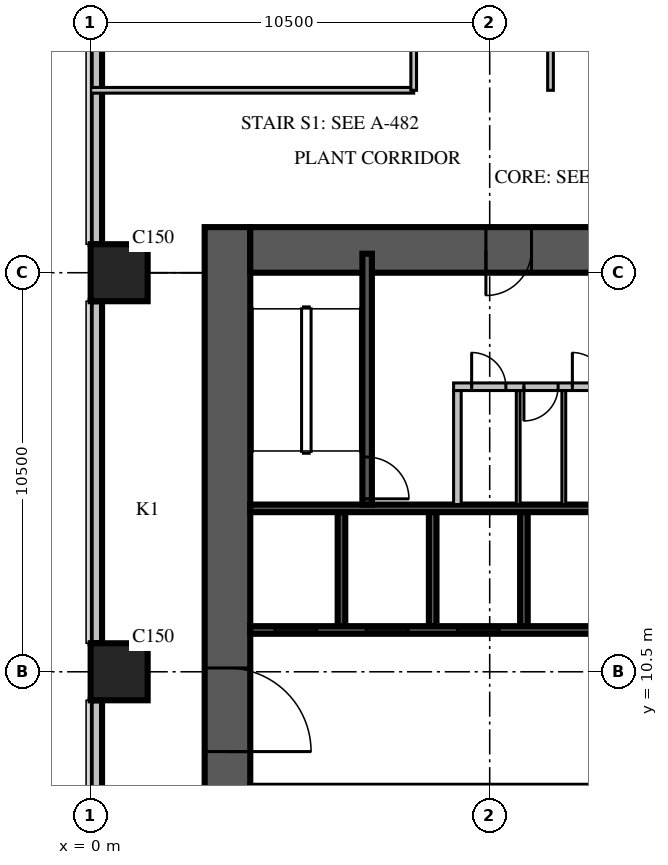
"""IFC4 building model, lengths in metres.
Left out: names, types, materials, properties, quantities, classifications, styles, units other than length and angle.
Written with IfcOpenShell. Run it as: python <this file> out.ifc"""

import sys

from ifc_helpers import new_model, si_unit, direction, frame, frame_2d, origin, origin_2d, place, context, subcontext, project, spatial, rectangle, extrude, source, transform, mapped, element, fill, save


model = new_model("IFC4")
c1 = context("Model", 3, precision=1e-05, world=origin(), true_north=direction((0.0, 1.0)))
c2 = subcontext(c1, "Body", "Model", "MODEL_VIEW")
j1 = project(units=[si_unit("LENGTHUNIT", "METRE"), si_unit("PLANEANGLEUNIT", "RADIAN")], contexts=[c1])
p1 = place(None, origin())
s1 = spatial("IfcSite", under=j1, at=p1, CompositionType="ELEMENT")
p2 = place(p1, origin())
s2 = spatial("IfcBuilding", under=s1, at=p2, CompositionType="ELEMENT")
p3 = place(p2, frame((0.0, 0.0, 34.5)))
s3 = spatial("IfcBuildingStorey", under=s2, at=p3, CompositionType="ELEMENT", Elevation=34.5)
p4 = place(p3, frame((0.75, 10.5, 0.0), z_axis=(0.0, 0.0, 1.0), x_axis=(1.0, 0.0, 0.0)))
e1 = element("IfcColumn", 1, at=p4, inside=s3, PredefinedType="COLUMN", context=c2, shape_type="SweptSolid", body=[
    extrude(rectangle(XDim=1.5, YDim=1.5, at=origin_2d()), origin(), (0.0, 0.0, 1.0), 6.0),
])
m1 = source(origin(), c2, "Body", "SweptSolid", [
    extrude(rectangle(XDim=1.5, YDim=1.5, at=origin_2d()), origin(), (0.0, 0.0, 1.0), 6.0),
])
p5 = place(p3, frame((0.75, 21.0, 0.0), z_axis=(0.0, 0.0, 1.0), x_axis=(1.0, 0.0, 0.0)))
e2 = element("IfcColumn", 2, at=p5, inside=s3, PredefinedType="COLUMN", context=c2, shape_type="MappedRepresentation", body=[
    mapped(m1, transform((0.0, 0.0, 0.0), scale=1.0)),
])
p6 = place(p3, frame((3.6, 4.2, 0.0), z_axis=(0.0, 0.0, 1.0), x_axis=(0.0, 1.0, 0.0)))
e3 = element("IfcWall", 3, at=p6, inside=s3, PredefinedType="SHEAR", context=c2, shape_type="SweptSolid", body=[
    extrude(rectangle(XDim=18.0, YDim=1.2, at=frame_2d((9.0, 0.0))), origin(), (0.0, 0.0, 1.0), 6.0),
])
m2 = source(origin(), c2, "Body", "SweptSolid", [
    extrude(rectangle(XDim=2.2, YDim=2.1, at=frame_2d((1.1, 1.05))), frame((0.0, 0.61, 0.0), z_axis=(0.0, -1.0, 0.0), x_axis=(1.0, 0.0, 0.0)), (0.0, 0.0, 1.0), 1.22),
])
p7 = place(p6, frame((4.2, 0.0, 0.0)))
e4 = element("IfcOpeningElement", 4, at=p7, cuts=e3, PredefinedType="OPENING", context=c2, shape_type="MappedRepresentation", body=[
    mapped(m2, transform((0.0, 0.0, 0.0), scale=1.0)),
])
m3 = source(origin(), c2, "Body", "SweptSolid", [
    extrude(rectangle(XDim=16.8, YDim=1.2, at=frame_2d((8.4, 0.0))), origin(), (0.0, 0.0, 1.0), 6.0),
])
p8 = place(p3, frame((4.2, 21.6, 0.0), z_axis=(0.0, 0.0, 1.0), x_axis=(1.0, 0.0, 0.0)))
e5 = element("IfcWall", 5, at=p8, inside=s3, PredefinedType="SHEAR", context=c2, shape_type="MappedRepresentation", body=[
    mapped(m3, transform((0.0, 0.0, 0.0), scale=1.0)),
])
m4 = source(origin(), c2, "Body", "SweptSolid", [
    extrude(rectangle(XDim=1.2, YDim=2.1, at=frame_2d((0.6, 1.05))), frame((0.0, 0.61, 0.0), z_axis=(0.0, -1.0, 0.0), x_axis=(1.0, 0.0, 0.0)), (0.0, 0.0, 1.0), 1.22),
])
p9 = place(p8, frame((6.2, 0.0, 0.0)))
e6 = element("IfcOpeningElement", 6, at=p9, cuts=e5, PredefinedType="OPENING", context=c2, shape_type="MappedRepresentation", body=[
    mapped(m4, transform((0.0, 0.0, 0.0), scale=1.0)),
])
m5 = source(origin(), c2, "Body", "SweptSolid", [
    extrude(rectangle(XDim=15.3, YDim=0.3, at=frame_2d((7.65, 0.0))), origin(), (0.0, 0.0, 1.0), 3.6),
])
p10 = place(p3, frame((0.15, 37.05, 0.0), z_axis=(0.0, 0.0, 1.0), x_axis=(0.0, -1.0, 0.0)))
e7 = element("IfcWall", 7, at=p10, inside=s3, PredefinedType="STANDARD", context=c2, shape_type="MappedRepresentation", body=[
    mapped(m5, transform((0.0, 0.0, 0.0), scale=1.0)),
])
m6 = source(origin(), c2, "Body", "SweptSolid", [
    extrude(rectangle(XDim=9.0, YDim=0.3, at=frame_2d((4.5, 0.0))), origin(), (0.0, 0.0, 1.0), 5.6),
])
p11 = place(p3, frame((0.15, 20.25, 0.0), z_axis=(0.0, 0.0, 1.0), x_axis=(0.0, -1.0, 0.0)))
e8 = element("IfcWall", 8, at=p11, inside=s3, PredefinedType="STANDARD", context=c2, shape_type="MappedRepresentation", body=[
    mapped(m6, transform((0.0, 0.0, 0.0), scale=1.0)),
])
m7 = source(origin(), c2, "Body", "SweptSolid", [
    extrude(rectangle(XDim=5.55, YDim=0.3, at=frame_2d((2.775, 0.0))), origin(), (0.0, 0.0, 1.0), 5.6),
])
p12 = place(p3, frame((0.15, 9.75, 0.0), z_axis=(0.0, 0.0, 1.0), x_axis=(0.0, -1.0, 0.0)))
e9 = element("IfcWall", 9, at=p12, inside=s3, PredefinedType="STANDARD", context=c2, shape_type="MappedRepresentation", body=[
    mapped(m7, transform((0.0, 0.0, 0.0), scale=1.0)),
])
p13 = place(p3, frame((6.6, 11.7, 0.0), z_axis=(0.0, 0.0, 1.0), x_axis=(0.0, 1.0, 0.0)))
e10 = element("IfcWall", 10, at=p13, inside=s3, PredefinedType="SOLIDWALL", context=c2, shape_type="SweptSolid", body=[
    extrude(rectangle(XDim=3.0, YDim=0.2, at=frame_2d((1.5, 0.0))), origin(), (0.0, 0.0, 1.0), 6.0),
])
m8 = source(origin(), c2, "Body", "SweptSolid", [
    extrude(rectangle(XDim=3.0, YDim=0.2, at=frame_2d((1.5, 0.0))), origin(), (0.0, 0.0, 1.0), 6.0),
])
for number, where, z_axis, x_axis in (
    (11, (9.0, 11.7, 0.0), (0.0, 0.0, 1.0), (0.0, 1.0, 0.0)),
    (12, (11.4, 11.7, 0.0), (0.0, 0.0, 1.0), (0.0, 1.0, 0.0)),
):
    element("IfcWall", number, at=place(p3, frame(where, z_axis=z_axis, x_axis=x_axis)), inside=s3, PredefinedType="SOLIDWALL", context=c2, shape_type="MappedRepresentation", body=[
        mapped(m8, transform((0.0, 0.0, 0.0), scale=1.0)),
    ])
m9 = source(origin(), c2, "Body", "SweptSolid", [
    extrude(rectangle(XDim=16.8, YDim=0.2, at=frame_2d((8.4, 0.0))), origin(), (0.0, 0.0, 1.0), 6.0),
])
p14 = place(p3, frame((4.2, 11.6, 0.0), z_axis=(0.0, 0.0, 1.0), x_axis=(1.0, 0.0, 0.0)))
e13 = element("IfcWall", 13, at=p14, inside=s3, PredefinedType="SOLIDWALL", context=c2, shape_type="MappedRepresentation", body=[
    mapped(m9, transform((0.0, 0.0, 0.0), scale=1.0)),
])
m10 = source(origin(), c2, "Body", "SweptSolid", [
    extrude(rectangle(XDim=1.1, YDim=2.1, at=frame_2d((0.55, 1.05))), frame((0.0, 0.11, 0.0), z_axis=(0.0, -1.0, 0.0), x_axis=(1.0, 0.0, 0.0)), (0.0, 0.0, 1.0), 0.22),
])
p15 = place(p14, frame((0.65, 0.0, 0.0)))
e14 = element("IfcOpeningElement", 14, at=p15, cuts=e13, PredefinedType="OPENING", context=c2, shape_type="MappedRepresentation", body=[
    mapped(m10, transform((0.0, 0.0, 0.0), scale=1.0)),
])
p16 = place(p14, frame((3.05, 0.0, 0.0)))
e15 = element("IfcOpeningElement", 15, at=p16, cuts=e13, PredefinedType="OPENING", context=c2, shape_type="MappedRepresentation", body=[
    mapped(m10, transform((0.0, 0.0, 0.0), scale=1.0)),
])
p17 = place(p14, frame((5.45, 0.0, 0.0)))
e16 = element("IfcOpeningElement", 16, at=p17, cuts=e13, PredefinedType="OPENING", context=c2, shape_type="MappedRepresentation", body=[
    mapped(m10, transform((0.0, 0.0, 0.0), scale=1.0)),
])
p18 = place(p3, frame((4.2, 14.8, 0.0), z_axis=(0.0, 0.0, 1.0), x_axis=(1.0, 0.0, 0.0)))
e17 = element("IfcWall", 17, at=p18, inside=s3, PredefinedType="SOLIDWALL", context=c2, shape_type="MappedRepresentation", body=[
    mapped(m9, transform((0.0, 0.0, 0.0), scale=1.0)),
])
p19 = place(p18, frame((10.25, 0.0, 0.0)))
e18 = element("IfcOpeningElement", 18, at=p19, cuts=e17, PredefinedType="OPENING", context=c2, shape_type="MappedRepresentation", body=[
    mapped(m10, transform((0.0, 0.0, 0.0), scale=1.0)),
])
p20 = place(p18, frame((12.65, 0.0, 0.0)))
e19 = element("IfcOpeningElement", 19, at=p20, cuts=e17, PredefinedType="OPENING", context=c2, shape_type="MappedRepresentation", body=[
    mapped(m10, transform((0.0, 0.0, 0.0), scale=1.0)),
])
p21 = place(p18, frame((15.05, 0.0, 0.0)))
e20 = element("IfcOpeningElement", 20, at=p21, cuts=e17, PredefinedType="OPENING", context=c2, shape_type="MappedRepresentation", body=[
    mapped(m10, transform((0.0, 0.0, 0.0), scale=1.0)),
])
p22 = place(p3, frame((7.275, 14.9, 0.0), z_axis=(0.0, 0.0, 1.0), x_axis=(0.0, 1.0, 0.0)))
e21 = element("IfcWall", 21, at=p22, inside=s3, PredefinedType="SOLIDWALL", context=c2, shape_type="SweptSolid", body=[
    extrude(rectangle(XDim=6.6, YDim=0.25, at=frame_2d((3.3, 0.0))), origin(), (0.0, 0.0, 1.0), 5.6),
])
m11 = source(origin(), c2, "Body", "SweptSolid", [
    extrude(rectangle(XDim=1.1, YDim=2.1, at=frame_2d((0.55, 1.05))), frame((0.0, 0.135, 0.0), z_axis=(0.0, -1.0, 0.0), x_axis=(1.0, 0.0, 0.0)), (0.0, 0.0, 1.0), 0.27),
])
p23 = place(p22, frame((0.15, 0.0, 0.0)))
e22 = element("IfcOpeningElement", 22, at=p23, cuts=e21, PredefinedType="OPENING", context=c2, shape_type="MappedRepresentation", body=[
    mapped(m11, transform((0.0, 0.0, 0.0), scale=1.0)),
])
p24 = place(p3, frame((9.65, 14.9, 0.0), z_axis=(0.0, 0.0, 1.0), x_axis=(0.0, 1.0, 0.0)))
e23 = element("IfcWall", 23, at=p24, inside=s3, PredefinedType="PARTITIONING", context=c2, shape_type="SweptSolid", body=[
    extrude(rectangle(XDim=3.0, YDim=0.2, at=frame_2d((1.5, 0.0))), origin(), (0.0, 0.0, 1.0), 5.6),
])
p25 = place(p3, frame((9.55, 18.0, 0.0), z_axis=(0.0, 0.0, 1.0), x_axis=(1.0, 0.0, 0.0)))
e24 = element("IfcWall", 24, at=p25, inside=s3, PredefinedType="PARTITIONING", context=c2, shape_type="SweptSolid", body=[
    extrude(rectangle(XDim=11.45, YDim=0.2, at=frame_2d((5.725, 0.0))), origin(), (0.0, 0.0, 1.0), 5.6),
])
m12 = source(origin(), c2, "Body", "SweptSolid", [
    extrude(rectangle(XDim=0.9, YDim=2.1, at=frame_2d((0.45, 1.05))), frame((0.0, 0.11, 0.0), z_axis=(0.0, -1.0, 0.0), x_axis=(1.0, 0.0, 0.0)), (0.0, 0.0, 1.0), 0.22),
])
p26 = place(p25, frame((0.475, 0.0, 0.0)))
e25 = element("IfcOpeningElement", 25, at=p26, cuts=e24, PredefinedType="OPENING", context=c2, shape_type="MappedRepresentation", body=[
    mapped(m12, transform((0.0, 0.0, 0.0), scale=1.0)),
])
p27 = place(p25, frame((1.85, 0.0, 0.0)))
e26 = element("IfcOpeningElement", 26, at=p27, cuts=e24, PredefinedType="OPENING", context=c2, shape_type="MappedRepresentation", body=[
    mapped(m12, transform((0.0, 0.0, 0.0), scale=1.0)),
])
p28 = place(p25, frame((3.125, 0.0, 0.0)))
e27 = element("IfcOpeningElement", 27, at=p28, cuts=e24, PredefinedType="OPENING", context=c2, shape_type="MappedRepresentation", body=[
    mapped(m12, transform((0.0, 0.0, 0.0), scale=1.0)),
])
p29 = place(p25, frame((7.35, 0.0, 0.0)))
e28 = element("IfcOpeningElement", 28, at=p29, cuts=e24, PredefinedType="OPENING", context=c2, shape_type="MappedRepresentation", body=[
    mapped(m10, transform((0.0, 0.0, 0.0), scale=1.0)),
])
p30 = place(p3, frame((11.25, 14.9, 0.0), z_axis=(0.0, 0.0, 1.0), x_axis=(0.0, 1.0, 0.0)))
e29 = element("IfcWall", 29, at=p30, inside=s3, PredefinedType="PARTITIONING", context=c2, shape_type="SweptSolid", body=[
    extrude(rectangle(XDim=3.0, YDim=0.1, at=frame_2d((1.5, 0.0))), origin(), (0.0, 0.0, 1.0), 5.6),
])
m13 = source(origin(), c2, "Body", "SweptSolid", [
    extrude(rectangle(XDim=3.0, YDim=0.1, at=frame_2d((1.5, 0.0))), origin(), (0.0, 0.0, 1.0), 5.6),
])
p31 = place(p3, frame((12.45, 14.9, 0.0), z_axis=(0.0, 0.0, 1.0), x_axis=(0.0, 1.0, 0.0)))
e30 = element("IfcWall", 30, at=p31, inside=s3, PredefinedType="PARTITIONING", context=c2, shape_type="MappedRepresentation", body=[
    mapped(m13, transform((0.0, 0.0, 0.0), scale=1.0)),
])
p32 = place(p3, frame((0.0, 25.8, 0.0), z_axis=(0.0, 0.0, 1.0), x_axis=(1.0, 0.0, 0.0)))
e31 = element("IfcWall", 31, at=p32, inside=s3, PredefinedType="PARTITIONING", context=c2, shape_type="SweptSolid", body=[
    extrude(rectangle(XDim=8.5, YDim=0.15, at=frame_2d((4.25, 0.0))), origin(), (0.0, 0.0, 1.0), 5.6),
])
p33 = place(p3, frame((8.5, 25.8, 0.0), z_axis=(0.0, 0.0, 1.0), x_axis=(0.0, 1.0, 0.0)))
e32 = element("IfcWall", 32, at=p33, inside=s3, PredefinedType="PARTITIONING", context=c2, shape_type="SweptSolid", body=[
    extrude(rectangle(XDim=12.6, YDim=0.15, at=frame_2d((6.3, 0.0))), origin(), (0.0, 0.0, 1.0), 5.6),
])
m14 = source(origin(), c2, "Body", "SweptSolid", [
    extrude(rectangle(XDim=1.2, YDim=2.1, at=frame_2d((0.6, 1.05))), frame((0.0, 0.085, 0.0), z_axis=(0.0, -1.0, 0.0), x_axis=(1.0, 0.0, 0.0)), (0.0, 0.0, 1.0), 0.17),
])
p34 = place(p33, frame((4.175, 0.0, 0.0)))
e33 = element("IfcOpeningElement", 33, at=p34, cuts=e32, PredefinedType="OPENING", context=c2, shape_type="MappedRepresentation", body=[
    mapped(m14, transform((0.0, 0.0, 0.0), scale=1.0)),
])
p35 = place(p33, frame((10.25, 0.0, 0.0)))
e34 = element("IfcOpeningElement", 34, at=p35, cuts=e32, PredefinedType="OPENING", context=c2, shape_type="MappedRepresentation", body=[
    mapped(m14, transform((0.0, 0.0, 0.0), scale=1.0)),
])
p36 = place(p3, frame((12.1, 25.8, 0.0), z_axis=(0.0, 0.0, 1.0), x_axis=(0.0, 1.0, 0.0)))
e35 = element("IfcWall", 35, at=p36, inside=s3, PredefinedType="PARTITIONING", context=c2, shape_type="SweptSolid", body=[
    extrude(rectangle(XDim=38.2, YDim=0.15, at=frame_2d((19.1, 0.0))), origin(), (0.0, 0.0, 1.0), 5.6),
])
p37 = place(p36, frame((4.175, 0.0, 0.0)))
e36 = element("IfcOpeningElement", 36, at=p37, cuts=e35, PredefinedType="OPENING", context=c2, shape_type="MappedRepresentation", body=[
    mapped(m14, transform((0.0, 0.0, 0.0), scale=1.0)),
])
p38 = place(p36, frame((13.725, 0.0, 0.0)))
e37 = element("IfcOpeningElement", 37, at=p38, cuts=e35, PredefinedType="OPENING", context=c2, shape_type="MappedRepresentation", body=[
    mapped(m14, transform((0.0, 0.0, 0.0), scale=1.0)),
])
p39 = place(p36, frame((23.275, 0.0, 0.0)))
e38 = element("IfcOpeningElement", 38, at=p39, cuts=e35, PredefinedType="OPENING", context=c2, shape_type="MappedRepresentation", body=[
    mapped(m14, transform((0.0, 0.0, 0.0), scale=1.0)),
])
p40 = place(p36, frame((32.825, 0.0, 0.0)))
e39 = element("IfcOpeningElement", 39, at=p40, cuts=e35, PredefinedType="OPENING", context=c2, shape_type="MappedRepresentation", body=[
    mapped(m14, transform((0.0, 0.0, 0.0), scale=1.0)),
])
m15 = source(origin(), c2, "Body", "SweptSolid", [
    extrude(rectangle(XDim=1.1, YDim=2.1, at=frame_2d((0.55, 1.05))), frame((0.0, 0.025, 0.0), z_axis=(0.0, -1.0, 0.0), x_axis=(1.0, 0.0, 0.0)), (0.0, 0.0, 1.0), 0.05),
])
p41 = place(p15, origin())
e40 = element("IfcDoor", 40, at=p41, inside=s3, OperationType="SLIDING_TO_LEFT", PredefinedType="DOOR", context=c2, shape_type="MappedRepresentation", body=[
    mapped(m15, transform((0.0, 0.0, 0.0), scale=1.0)),
])
fill(e14, e40)
p42 = place(p16, origin())
e41 = element("IfcDoor", 41, at=p42, inside=s3, OperationType="SLIDING_TO_LEFT", PredefinedType="DOOR", context=c2, shape_type="MappedRepresentation", body=[
    mapped(m15, transform((0.0, 0.0, 0.0), scale=1.0)),
])
fill(e15, e41)
p43 = place(p17, origin())
e42 = element("IfcDoor", 42, at=p43, inside=s3, OperationType="SLIDING_TO_LEFT", PredefinedType="DOOR", context=c2, shape_type="MappedRepresentation", body=[
    mapped(m15, transform((0.0, 0.0, 0.0), scale=1.0)),
])
fill(e16, e42)
p44 = place(p23, origin())
e43 = element("IfcDoor", 43, at=p44, inside=s3, OperationType="SINGLE_SWING_RIGHT", PredefinedType="DOOR", context=c2, shape_type="MappedRepresentation", body=[
    mapped(m15, transform((0.0, 0.0, 0.0), scale=1.0)),
])
fill(e22, e43)
m16 = source(origin(), c2, "Body", "SweptSolid", [
    extrude(rectangle(XDim=0.9, YDim=2.1, at=frame_2d((0.45, 1.05))), frame((0.0, 0.025, 0.0), z_axis=(0.0, -1.0, 0.0), x_axis=(1.0, 0.0, 0.0)), (0.0, 0.0, 1.0), 0.05),
])
p45 = place(p26, origin())
e44 = element("IfcDoor", 44, at=p45, inside=s3, OperationType="SINGLE_SWING_LEFT", PredefinedType="DOOR", context=c2, shape_type="MappedRepresentation", body=[
    mapped(m16, transform((0.0, 0.0, 0.0), scale=1.0)),
])
fill(e25, e44)
p46 = place(p27, origin())
e45 = element("IfcDoor", 45, at=p46, inside=s3, OperationType="SINGLE_SWING_RIGHT", PredefinedType="DOOR", context=c2, shape_type="MappedRepresentation", body=[
    mapped(m16, transform((0.0, 0.0, 0.0), scale=1.0)),
])
fill(e26, e45)
p47 = place(p28, origin())
e46 = element("IfcDoor", 46, at=p47, inside=s3, OperationType="SINGLE_SWING_LEFT", PredefinedType="DOOR", context=c2, shape_type="MappedRepresentation", body=[
    mapped(m16, transform((0.0, 0.0, 0.0), scale=1.0)),
])
fill(e27, e46)
m17 = source(origin(), c2, "Body", "SweptSolid", [
    extrude(rectangle(XDim=2.2, YDim=2.1, at=frame_2d((1.1, 1.05))), frame((0.0, 0.025, 0.0), z_axis=(0.0, -1.0, 0.0), x_axis=(1.0, 0.0, 0.0)), (0.0, 0.0, 1.0), 0.05),
])
p48 = place(p7, origin())
e47 = element("IfcDoor", 47, at=p48, inside=s3, OperationType="DOUBLE_DOOR_SINGLE_SWING", PredefinedType="DOOR", context=c2, shape_type="MappedRepresentation", body=[
    mapped(m17, transform((0.0, 0.0, 0.0), scale=1.0)),
])
fill(e4, e47)
m18 = source(origin(), c2, "Body", "SweptSolid", [
    extrude(rectangle(XDim=1.2, YDim=2.1, at=frame_2d((0.6, 1.05))), frame((0.0, 0.025, 0.0), z_axis=(0.0, -1.0, 0.0), x_axis=(1.0, 0.0, 0.0)), (0.0, 0.0, 1.0), 0.05),
])
p49 = place(p9, origin())
e48 = element("IfcDoor", 48, at=p49, inside=s3, OperationType="SINGLE_SWING_RIGHT", PredefinedType="DOOR", context=c2, shape_type="MappedRepresentation", body=[
    mapped(m18, transform((0.0, 0.0, 0.0), scale=1.0)),
])
fill(e6, e48)
save(model, sys.argv[1])
